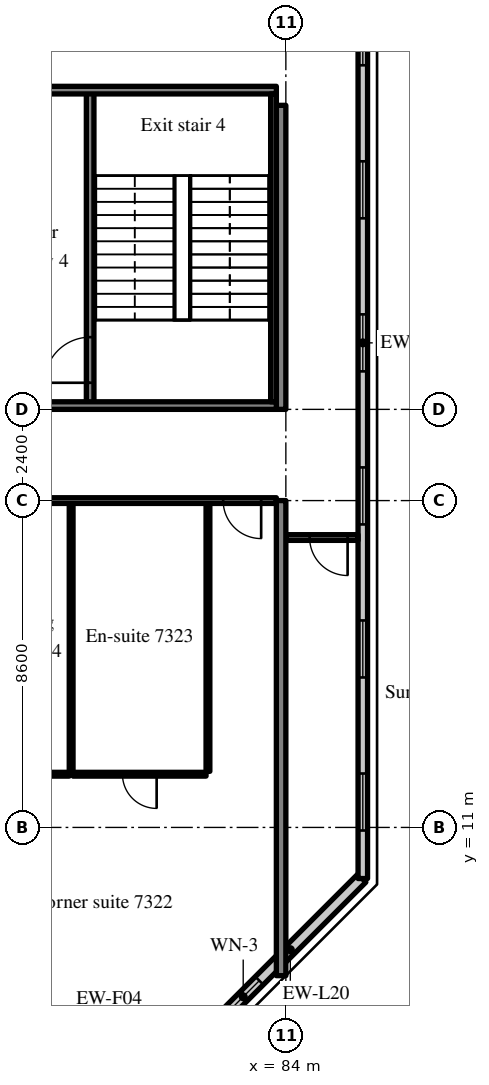
"""IFC4 building model, lengths in metres.
Left out: names, types, materials, properties, quantities, classifications, styles, units other than length and angle.
Written with IfcOpenShell. Run it as: python <this file> out.ifc"""

import sys

from ifc_helpers import new_model, si_unit, direction, frame, frame_2d, origin, place, context, subcontext, project, spatial, rectangle, extrude, source, transform, mapped, element, fill, save


model = new_model("IFC4")
c1 = context("Model", 3, precision=1e-05, world=origin(), true_north=direction((0.0, 1.0)))
c2 = subcontext(c1, "Body", "Model", "MODEL_VIEW")
j1 = project(units=[si_unit("LENGTHUNIT", "METRE"), si_unit("PLANEANGLEUNIT", "RADIAN")], contexts=[c1])
p1 = place(None, origin())
s1 = spatial("IfcSite", under=j1, at=p1, CompositionType="ELEMENT")
p2 = place(p1, origin())
s2 = spatial("IfcBuilding", under=s1, at=p2, CompositionType="ELEMENT")
p3 = place(p2, frame((0.0, 0.0, 305.7)))
s3 = spatial("IfcBuildingStorey", under=s2, at=p3, CompositionType="ELEMENT", Elevation=305.7)
m1 = source(origin(), c2, "Body", "SweptSolid", [
    extrude(rectangle(XDim=12.5, YDim=0.25, at=frame_2d((6.25, 0.0))), origin(), (0.0, 0.0, 1.0), 3.72),
])
p4 = place(p3, frame((83.875, 7.1, 0.0), z_axis=(0.0, 0.0, 1.0), x_axis=(0.0, 1.0, 0.0)))
e1 = element("IfcWall", 1, at=p4, inside=s3, PredefinedType="SHEAR", context=c2, shape_type="MappedRepresentation", body=[
    mapped(m1, transform((0.0, 0.0, 0.0), scale=1.0)),
])
m2 = source(origin(), c2, "Body", "SweptSolid", [
    extrude(rectangle(XDim=8.0, YDim=0.25, at=frame_2d((4.0, 0.0))), origin(), (0.0, 0.0, 1.0), 3.72),
])
p5 = place(p3, frame((83.875, 22.0, 0.0), z_axis=(0.0, 0.0, 1.0), x_axis=(0.0, 1.0, 0.0)))
e2 = element("IfcWall", 2, at=p5, inside=s3, PredefinedType="SHEAR", context=c2, shape_type="MappedRepresentation", body=[
    mapped(m2, transform((0.0, 0.0, 0.0), scale=1.0)),
])
m3 = source(origin(), c2, "Body", "SweptSolid", [
    extrude(rectangle(XDim=5.326, YDim=0.3, at=frame_2d((2.663, 0.0))), origin(), (0.0, 0.0, 1.0), 3.72),
])
p6 = place(p3, frame((82.234, 5.9, 0.0), z_axis=(0.0, 0.0, 1.0), x_axis=(0.707083859269, 0.707129702361, 0.0)))
e3 = element("IfcWall", 3, at=p6, inside=s3, PredefinedType="SOLIDWALL", context=c2, shape_type="MappedRepresentation", body=[
    mapped(m3, transform((0.0, 0.0, 0.0), scale=1.0)),
])
m4 = source(origin(), c2, "Body", "SweptSolid", [
    extrude(rectangle(XDim=1.2, YDim=1.5, at=frame_2d((0.6, 0.75))), frame((0.0, 0.16, 0.0), z_axis=(0.0, -1.0, 0.0), x_axis=(1.0, 0.0, 0.0)), (0.0, 0.0, 1.0), 0.32),
])
p7 = place(p6, frame((0.31, 0.0, 0.9)))
e4 = element("IfcOpeningElement", 4, at=p7, cuts=e3, PredefinedType="OPENING", context=c2, shape_type="MappedRepresentation", body=[
    mapped(m4, transform((0.0, 0.0, 0.0), scale=1.0)),
])
m5 = source(origin(), c2, "Body", "SweptSolid", [
    extrude(rectangle(XDim=28.189, YDim=0.25, at=frame_2d((14.095, 0.0))), origin(), (0.0, 0.0, 1.0), 3.72),
])
p8 = place(p3, frame((86.025, 9.655, 0.0), z_axis=(0.0, 0.0, 1.0), x_axis=(0.0, 1.0, 0.0)))
e5 = element("IfcWall", 5, at=p8, inside=s3, PredefinedType="SOLIDWALL", context=c2, shape_type="MappedRepresentation", body=[
    mapped(m5, transform((0.0, 0.0, 0.0), scale=1.0)),
])
m6 = source(origin(), c2, "Body", "SweptSolid", [
    extrude(rectangle(XDim=1.5, YDim=1.5, at=frame_2d((0.75, 0.75))), frame((0.0, 0.135, 0.0), z_axis=(0.0, -1.0, 0.0), x_axis=(1.0, 0.0, 0.0)), (0.0, 0.0, 1.0), 0.27),
])
p9 = place(p8, frame((1.263, 0.0, 0.9)))
e6 = element("IfcOpeningElement", 6, at=p9, cuts=e5, PredefinedType="OPENING", context=c2, shape_type="MappedRepresentation", body=[
    mapped(m6, transform((0.0, 0.0, 0.0), scale=1.0)),
])
p10 = place(p8, frame((5.291, 0.0, 0.9)))
e7 = element("IfcOpeningElement", 7, at=p10, cuts=e5, PredefinedType="OPENING", context=c2, shape_type="MappedRepresentation", body=[
    mapped(m6, transform((0.0, 0.0, 0.0), scale=1.0)),
])
p11 = place(p8, frame((9.318, 0.0, 0.9)))
e8 = element("IfcOpeningElement", 8, at=p11, cuts=e5, PredefinedType="OPENING", context=c2, shape_type="MappedRepresentation", body=[
    mapped(m6, transform((0.0, 0.0, 0.0), scale=1.0)),
])
p12 = place(p8, frame((13.345, 0.0, 0.9)))
e9 = element("IfcOpeningElement", 9, at=p12, cuts=e5, PredefinedType="OPENING", context=c2, shape_type="MappedRepresentation", body=[
    mapped(m6, transform((0.0, 0.0, 0.0), scale=1.0)),
])
p13 = place(p8, frame((17.372, 0.0, 0.9)))
e10 = element("IfcOpeningElement", 10, at=p13, cuts=e5, PredefinedType="OPENING", context=c2, shape_type="MappedRepresentation", body=[
    mapped(m6, transform((0.0, 0.0, 0.0), scale=1.0)),
])
p14 = place(p8, frame((21.399, 0.0, 0.9)))
e11 = element("IfcOpeningElement", 11, at=p14, cuts=e5, PredefinedType="OPENING", context=c2, shape_type="MappedRepresentation", body=[
    mapped(m6, transform((0.0, 0.0, 0.0), scale=1.0)),
])
p15 = place(p8, frame((25.426, 0.0, 0.9)))
e12 = element("IfcOpeningElement", 12, at=p15, cuts=e5, PredefinedType="OPENING", context=c2, shape_type="MappedRepresentation", body=[
    mapped(m6, transform((0.0, 0.0, 0.0), scale=1.0)),
])
m7 = source(origin(), c2, "Body", "SweptSolid", [
    extrude(rectangle(XDim=8.3, YDim=0.2, at=frame_2d((4.15, 0.0))), origin(), (0.0, 0.0, 1.0), 3.72),
])
p16 = place(p3, frame((78.85, 22.1, 0.0), z_axis=(0.0, 0.0, 1.0), x_axis=(0.0, 1.0, 0.0)))
e13 = element("IfcWall", 13, at=p16, inside=s3, PredefinedType="SOLIDWALL", context=c2, shape_type="MappedRepresentation", body=[
    mapped(m7, transform((0.0, 0.0, 0.0), scale=1.0)),
])
m8 = source(origin(), c2, "Body", "SweptSolid", [
    extrude(rectangle(XDim=1.2, YDim=2.1, at=frame_2d((0.6, 1.05))), frame((0.0, 0.11, 0.0), z_axis=(0.0, -1.0, 0.0), x_axis=(1.0, 0.0, 0.0)), (0.0, 0.0, 1.0), 0.22),
])
p17 = place(p16, frame((0.6, 0.0, 0.0)))
e14 = element("IfcOpeningElement", 14, at=p17, cuts=e13, PredefinedType="OPENING", context=c2, shape_type="MappedRepresentation", body=[
    mapped(m8, transform((0.0, 0.0, 0.0), scale=1.0)),
])
m9 = source(origin(), c2, "Body", "SweptSolid", [
    extrude(rectangle(XDim=8.15, YDim=0.2, at=frame_2d((4.075, 0.0))), origin(), (0.0, 0.0, 1.0), 3.72),
])
p18 = place(p3, frame((83.75, 22.1, 0.0), z_axis=(0.0, 0.0, 1.0), x_axis=(-1.0, 0.0, 0.0)))
e15 = element("IfcWall", 15, at=p18, inside=s3, PredefinedType="SOLIDWALL", context=c2, shape_type="MappedRepresentation", body=[
    mapped(m9, transform((0.0, 0.0, 0.0), scale=1.0)),
])
p19 = place(p18, frame((5.95, 0.0, 0.0)))
e16 = element("IfcOpeningElement", 16, at=p19, cuts=e15, PredefinedType="OPENING", context=c2, shape_type="MappedRepresentation", body=[
    mapped(m8, transform((0.0, 0.0, 0.0), scale=1.0)),
])
p20 = place(p3, frame((83.75, 30.4, 0.0), z_axis=(0.0, 0.0, 1.0), x_axis=(-1.0, 0.0, 0.0)))
e17 = element("IfcWall", 17, at=p20, inside=s3, PredefinedType="SOLIDWALL", context=c2, shape_type="MappedRepresentation", body=[
    mapped(m9, transform((0.0, 0.0, 0.0), scale=1.0)),
])
m10 = source(origin(), c2, "Body", "SweptSolid", [
    extrude(rectangle(XDim=1.0, YDim=2.1, at=frame_2d((0.5, 1.05))), frame((0.0, 0.11, 0.0), z_axis=(0.0, -1.0, 0.0), x_axis=(1.0, 0.0, 0.0)), (0.0, 0.0, 1.0), 0.22),
])
p21 = place(p20, frame((6.05, 0.0, 0.0)))
e18 = element("IfcOpeningElement", 18, at=p21, cuts=e17, PredefinedType="OPENING", context=c2, shape_type="MappedRepresentation", body=[
    mapped(m10, transform((0.0, 0.0, 0.0), scale=1.0)),
])
m11 = source(origin(), c2, "Body", "SweptSolid", [
    extrude(rectangle(XDim=8.1, YDim=0.15, at=frame_2d((4.05, 0.0))), origin(), (0.0, 0.0, 1.0), 3.72),
])
p22 = place(p3, frame((83.675, 22.2, 0.0), z_axis=(0.0, 0.0, 1.0), x_axis=(0.0, 1.0, 0.0)))
e19 = element("IfcWall", 19, at=p22, inside=s3, PredefinedType="SOLIDWALL", context=c2, shape_type="MappedRepresentation", body=[
    mapped(m11, transform((0.0, 0.0, 0.0), scale=1.0)),
])
m12 = source(origin(), c2, "Body", "SweptSolid", [
    extrude(rectangle(XDim=7.05, YDim=0.1, at=frame_2d((3.525, 0.0))), origin(), (0.0, 0.0, 1.0), 3.72),
])
for number, where, z_axis, x_axis in (
    (20, (81.95, 12.475, 0.0), (0.0, 0.0, 1.0), (0.0, 1.0, 0.0)),
    (21, (78.35, 12.475, 0.0), (0.0, 0.0, 1.0), (0.0, 1.0, 0.0)),
):
    element("IfcWall", number, at=place(p3, frame(where, z_axis=z_axis, x_axis=x_axis)), inside=s3, PredefinedType="PARTITIONING", context=c2, shape_type="MappedRepresentation", body=[
        mapped(m12, transform((0.0, 0.0, 0.0), scale=1.0)),
    ])
m13 = source(origin(), c2, "Body", "SweptSolid", [
    extrude(rectangle(XDim=3.5, YDim=0.1, at=frame_2d((1.75, 0.0))), origin(), (0.0, 0.0, 1.0), 3.72),
])
p23 = place(p3, frame((78.4, 12.4, 0.0), z_axis=(0.0, 0.0, 1.0), x_axis=(1.0, 0.0, 0.0)))
e22 = element("IfcWall", 22, at=p23, inside=s3, PredefinedType="PARTITIONING", context=c2, shape_type="MappedRepresentation", body=[
    mapped(m13, transform((0.0, 0.0, 0.0), scale=1.0)),
])
m14 = source(origin(), c2, "Body", "SweptSolid", [
    extrude(rectangle(XDim=0.9, YDim=2.1, at=frame_2d((0.45, 1.05))), frame((0.0, 0.06, 0.0), z_axis=(0.0, -1.0, 0.0), x_axis=(1.0, 0.0, 0.0)), (0.0, 0.0, 1.0), 0.12),
])
p24 = place(p23, frame((1.3, 0.0, 0.0)))
e23 = element("IfcOpeningElement", 23, at=p24, cuts=e22, PredefinedType="OPENING", context=c2, shape_type="MappedRepresentation", body=[
    mapped(m14, transform((0.0, 0.0, 0.0), scale=1.0)),
])
m15 = source(origin(), c2, "Body", "SweptSolid", [
    extrude(rectangle(XDim=2.575, YDim=0.1, at=frame_2d((1.288, 0.0))), origin(), (0.0, 0.0, 1.0), 3.72),
])
p25 = place(p3, frame((75.725, 12.4, 0.0), z_axis=(0.0, 0.0, 1.0), x_axis=(1.0, 0.0, 0.0)))
e24 = element("IfcWall", 24, at=p25, inside=s3, PredefinedType="PARTITIONING", context=c2, shape_type="MappedRepresentation", body=[
    mapped(m15, transform((0.0, 0.0, 0.0), scale=1.0)),
])
p26 = place(p25, frame((0.838, 0.0, 0.0)))
e25 = element("IfcOpeningElement", 25, at=p26, cuts=e24, PredefinedType="OPENING", context=c2, shape_type="MappedRepresentation", body=[
    mapped(m14, transform((0.0, 0.0, 0.0), scale=1.0)),
])
m16 = source(origin(), c2, "Body", "SweptSolid", [
    extrude(rectangle(XDim=8.025, YDim=0.15, at=frame_2d((4.012, 0.0))), origin(), (0.0, 0.0, 1.0), 3.02),
])
p27 = place(p3, frame((75.725, 19.6, 0.0), z_axis=(0.0, 0.0, 1.0), x_axis=(1.0, 0.0, 0.0)))
e26 = element("IfcWall", 26, at=p27, inside=s3, PredefinedType="PARTITIONING", context=c2, shape_type="MappedRepresentation", body=[
    mapped(m16, transform((0.0, 0.0, 0.0), scale=1.0)),
])
m17 = source(origin(), c2, "Body", "SweptSolid", [
    extrude(rectangle(XDim=1.0, YDim=2.1, at=frame_2d((0.5, 1.05))), frame((0.0, 0.085, 0.0), z_axis=(0.0, -1.0, 0.0), x_axis=(1.0, 0.0, 0.0)), (0.0, 0.0, 1.0), 0.17),
])
p28 = place(p27, frame((6.625, 0.0, 0.0)))
e27 = element("IfcOpeningElement", 27, at=p28, cuts=e26, PredefinedType="OPENING", context=c2, shape_type="MappedRepresentation", body=[
    mapped(m17, transform((0.0, 0.0, 0.0), scale=1.0)),
])
m18 = source(origin(), c2, "Body", "SweptSolid", [
    extrude(rectangle(XDim=1.9, YDim=0.15, at=frame_2d((0.95, 0.0))), origin(), (0.0, 0.0, 1.0), 3.02),
])
p29 = place(p3, frame((84.0, 18.628, 0.0), z_axis=(0.0, 0.0, 1.0), x_axis=(1.0, 0.0, 0.0)))
e28 = element("IfcWall", 28, at=p29, inside=s3, PredefinedType="PARTITIONING", context=c2, shape_type="MappedRepresentation", body=[
    mapped(m18, transform((0.0, 0.0, 0.0), scale=1.0)),
])
p30 = place(p29, frame((0.625, 0.0, 0.0)))
e29 = element("IfcOpeningElement", 29, at=p30, cuts=e28, PredefinedType="OPENING", context=c2, shape_type="MappedRepresentation", body=[
    mapped(m17, transform((0.0, 0.0, 0.0), scale=1.0)),
])
m19 = source(origin(), c2, "Body", "SweptSolid", [
    extrude(rectangle(XDim=1.2, YDim=1.5, at=frame_2d((0.6, 0.75))), frame((0.0, 0.03, 0.0), z_axis=(0.0, -1.0, 0.0), x_axis=(1.0, 0.0, 0.0)), (0.0, 0.0, 1.0), 0.06),
])
p31 = place(p7, origin())
e30 = element("IfcWindow", 30, at=p31, inside=s3, PartitioningType="SINGLE_PANEL", PredefinedType="WINDOW", context=c2, shape_type="MappedRepresentation", body=[
    mapped(m19, transform((0.0, 0.0, 0.0), scale=1.0)),
])
fill(e4, e30)
m20 = source(origin(), c2, "Body", "SweptSolid", [
    extrude(rectangle(XDim=1.5, YDim=1.5, at=frame_2d((0.75, 0.75))), frame((0.0, 0.03, 0.0), z_axis=(0.0, -1.0, 0.0), x_axis=(1.0, 0.0, 0.0)), (0.0, 0.0, 1.0), 0.06),
])
p32 = place(p9, origin())
e31 = element("IfcWindow", 31, at=p32, inside=s3, PartitioningType="SINGLE_PANEL", PredefinedType="WINDOW", context=c2, shape_type="MappedRepresentation", body=[
    mapped(m20, transform((0.0, 0.0, 0.0), scale=1.0)),
])
fill(e6, e31)
p33 = place(p10, origin())
e32 = element("IfcWindow", 32, at=p33, inside=s3, PartitioningType="SINGLE_PANEL", PredefinedType="WINDOW", context=c2, shape_type="MappedRepresentation", body=[
    mapped(m20, transform((0.0, 0.0, 0.0), scale=1.0)),
])
fill(e7, e32)
p34 = place(p11, origin())
e33 = element("IfcWindow", 33, at=p34, inside=s3, PartitioningType="SINGLE_PANEL", PredefinedType="WINDOW", context=c2, shape_type="MappedRepresentation", body=[
    mapped(m20, transform((0.0, 0.0, 0.0), scale=1.0)),
])
fill(e8, e33)
p35 = place(p12, origin())
e34 = element("IfcWindow", 34, at=p35, inside=s3, PartitioningType="SINGLE_PANEL", PredefinedType="WINDOW", context=c2, shape_type="MappedRepresentation", body=[
    mapped(m20, transform((0.0, 0.0, 0.0), scale=1.0)),
])
fill(e9, e34)
p36 = place(p13, origin())
e35 = element("IfcWindow", 35, at=p36, inside=s3, PartitioningType="SINGLE_PANEL", PredefinedType="WINDOW", context=c2, shape_type="MappedRepresentation", body=[
    mapped(m20, transform((0.0, 0.0, 0.0), scale=1.0)),
])
fill(e10, e35)
p37 = place(p14, origin())
e36 = element("IfcWindow", 36, at=p37, inside=s3, PartitioningType="SINGLE_PANEL", PredefinedType="WINDOW", context=c2, shape_type="MappedRepresentation", body=[
    mapped(m20, transform((0.0, 0.0, 0.0), scale=1.0)),
])
fill(e11, e36)
m21 = source(origin(), c2, "Body", "SweptSolid", [
    extrude(rectangle(XDim=1.2, YDim=2.1, at=frame_2d((0.6, 1.05))), frame((0.0, 0.025, 0.0), z_axis=(0.0, -1.0, 0.0), x_axis=(1.0, 0.0, 0.0)), (0.0, 0.0, 1.0), 0.05),
])
p38 = place(p17, origin())
e37 = element("IfcDoor", 37, at=p38, inside=s3, OperationType="SINGLE_SWING_LEFT", PredefinedType="DOOR", context=c2, shape_type="MappedRepresentation", body=[
    mapped(m21, transform((0.0, 0.0, 0.0), scale=1.0)),
])
fill(e14, e37)
m22 = source(origin(), c2, "Body", "SweptSolid", [
    extrude(rectangle(XDim=0.9, YDim=2.1, at=frame_2d((0.45, 1.05))), frame((0.0, 0.025, 0.0), z_axis=(0.0, -1.0, 0.0), x_axis=(1.0, 0.0, 0.0)), (0.0, 0.0, 1.0), 0.05),
])
p39 = place(p24, origin())
e38 = element("IfcDoor", 38, at=p39, inside=s3, OperationType="SINGLE_SWING_RIGHT", PredefinedType="DOOR", context=c2, shape_type="MappedRepresentation", body=[
    mapped(m22, transform((0.0, 0.0, 0.0), scale=1.0)),
])
fill(e23, e38)
m23 = source(origin(), c2, "Body", "SweptSolid", [
    extrude(rectangle(XDim=1.0, YDim=2.1, at=frame_2d((0.5, 1.05))), frame((0.0, 0.025, 0.0), z_axis=(0.0, -1.0, 0.0), x_axis=(1.0, 0.0, 0.0)), (0.0, 0.0, 1.0), 0.05),
])
p40 = place(p28, origin())
e39 = element("IfcDoor", 39, at=p40, inside=s3, OperationType="SINGLE_SWING_RIGHT", PredefinedType="DOOR", context=c2, shape_type="MappedRepresentation", body=[
    mapped(m23, transform((0.0, 0.0, 0.0), scale=1.0)),
])
fill(e27, e39)
p41 = place(p30, origin())
e40 = element("IfcDoor", 40, at=p41, inside=s3, OperationType="SINGLE_SWING_RIGHT", PredefinedType="DOOR", context=c2, shape_type="MappedRepresentation", body=[
    mapped(m23, transform((0.0, 0.0, 0.0), scale=1.0)),
])
fill(e29, e40)
save(model, sys.argv[1])
